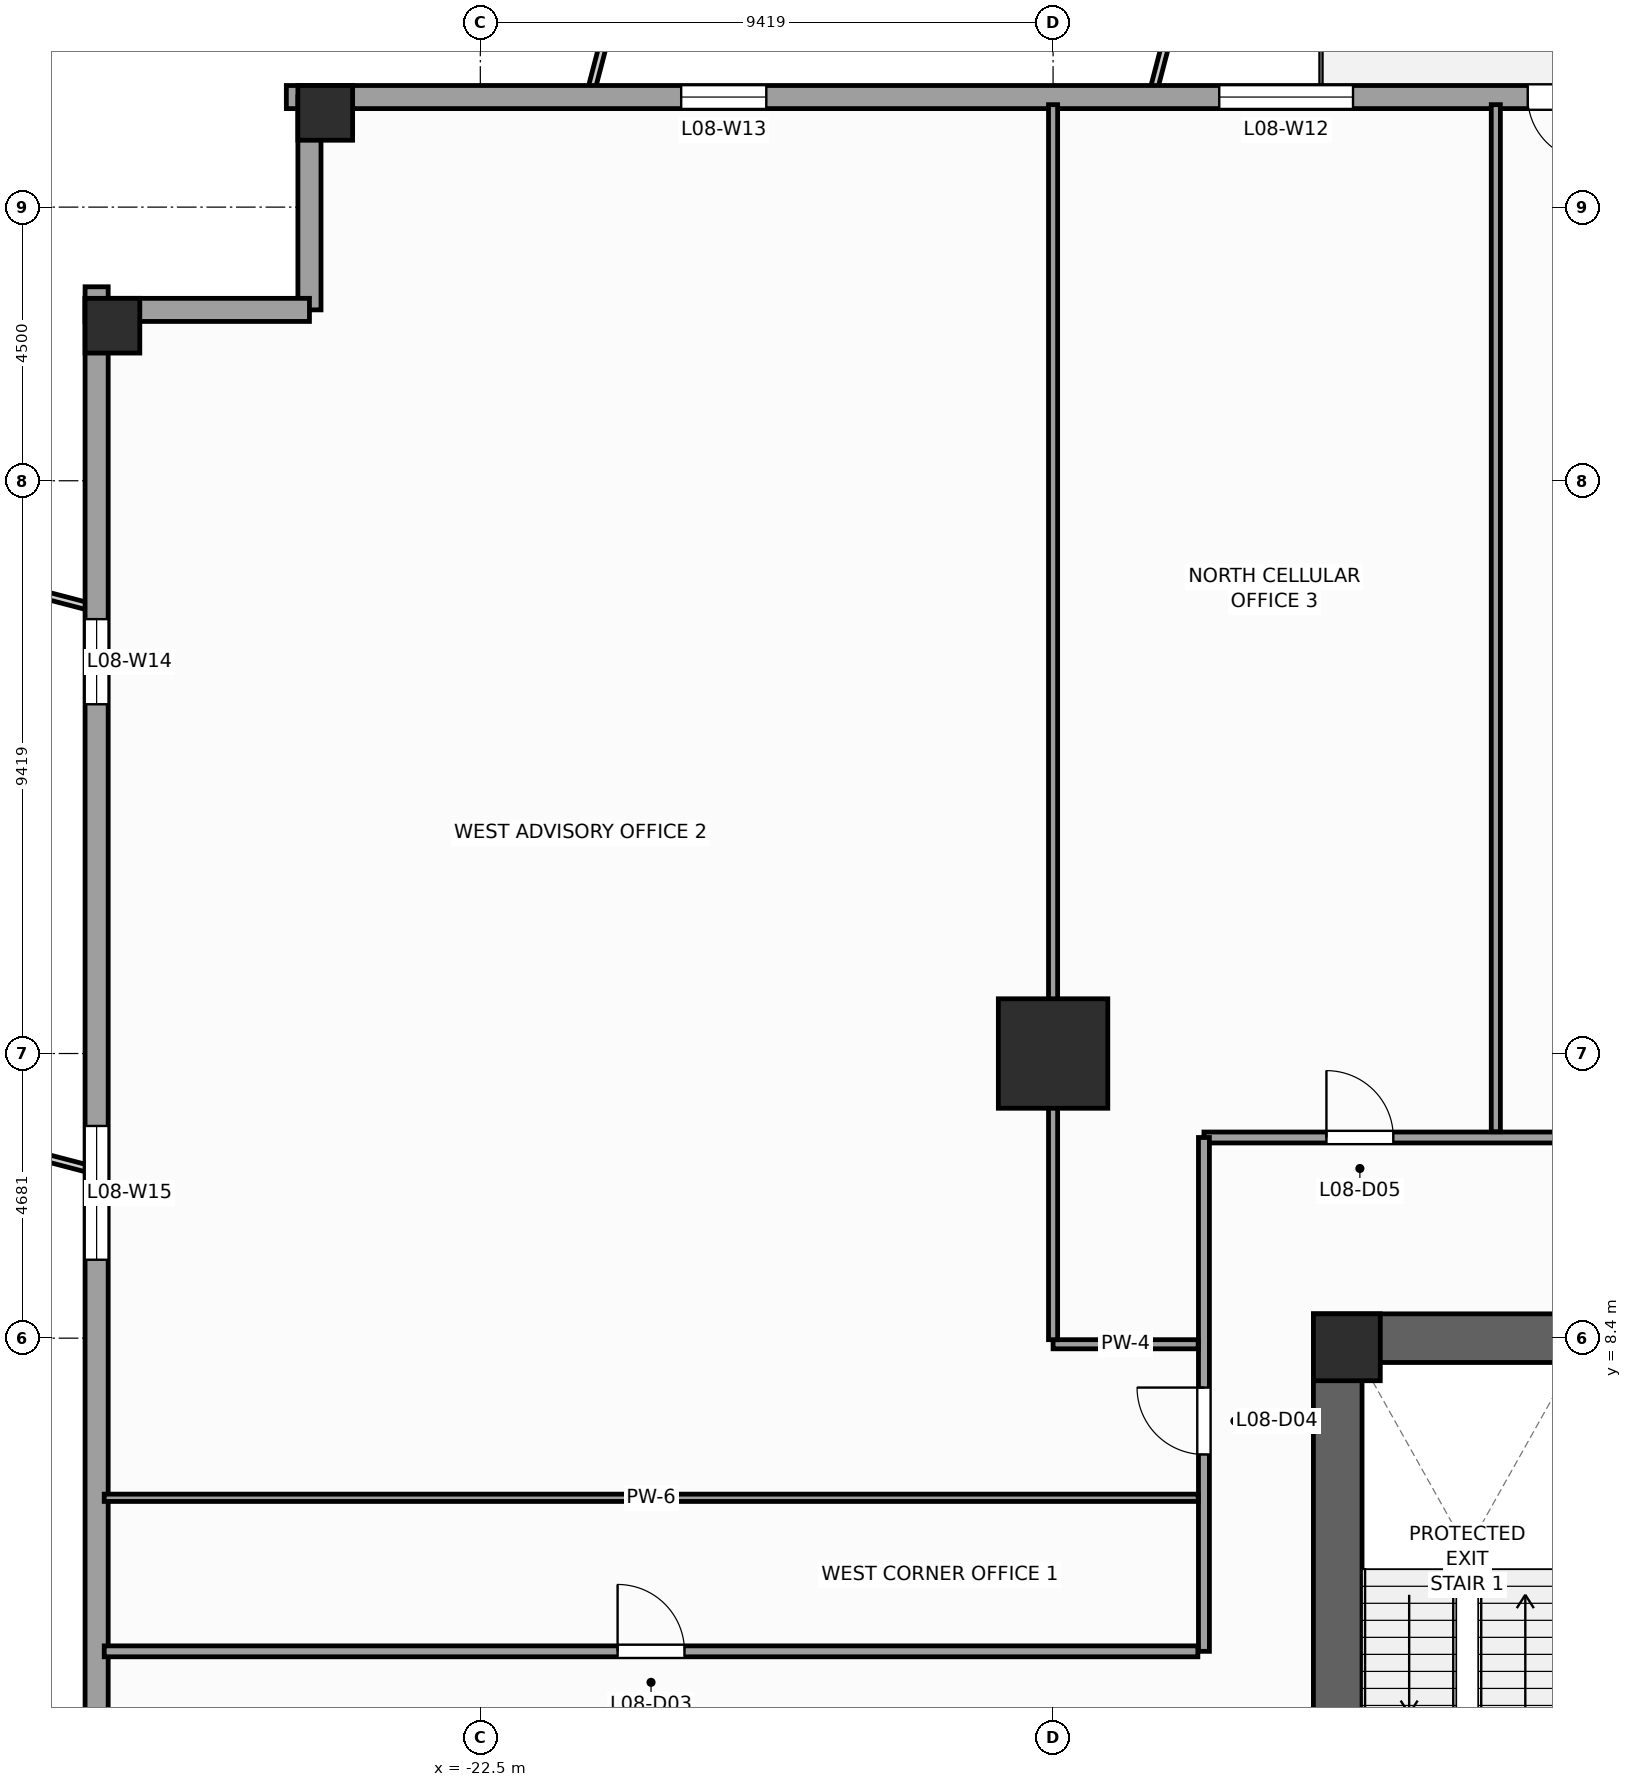
"""IFC4 building model, lengths in metres.
Left out: names, types, materials, properties, quantities, classifications, styles, units other than length and angle.
Written with IfcOpenShell. Run it as: python <this file> out.ifc"""

import sys

from ifc_helpers import new_model, si_unit, direction, frame, frame_2d, origin, origin_2d, place, context, subcontext, project, spatial, rectangle, extrude, source, transform, mapped, element, fill, save


model = new_model("IFC4")
c1 = context("Model", 3, precision=1e-05, world=origin(), true_north=direction((0.0, 1.0)))
c2 = subcontext(c1, "Body", "Model", "MODEL_VIEW")
j1 = project(units=[si_unit("LENGTHUNIT", "METRE"), si_unit("PLANEANGLEUNIT", "RADIAN")], contexts=[c1])
p1 = place(None, origin())
s1 = spatial("IfcSite", under=j1, at=p1, CompositionType="ELEMENT")
p2 = place(p1, origin())
s2 = spatial("IfcBuilding", under=s1, at=p2, CompositionType="ELEMENT")
p3 = place(p2, frame((0.0, 0.0, 38.0)))
s3 = spatial("IfcBuildingStorey", under=s2, at=p3, CompositionType="ELEMENT", Elevation=38.0)
p4 = place(p3, frame((-8.8, 8.4, 0.0), z_axis=(0.0, 0.0, 1.0), x_axis=(1.0, 0.0, 0.0)))
e1 = element("IfcWall", 1, at=p4, inside=s3, PredefinedType="SHEAR", context=c2, shape_type="SweptSolid", body=[
    extrude(rectangle(XDim=17.6, YDim=0.8, at=frame_2d((8.8, 0.0))), origin(), (0.0, 0.0, 1.0), 4.0),
])
p5 = place(p3, frame((-8.4, -8.0, 0.0), z_axis=(0.0, 0.0, 1.0), x_axis=(0.0, 1.0, 0.0)))
e2 = element("IfcWall", 2, at=p5, inside=s3, PredefinedType="SHEAR", context=c2, shape_type="SweptSolid", body=[
    extrude(rectangle(XDim=16.0, YDim=0.8, at=frame_2d((8.0, 0.0))), origin(), (0.0, 0.0, 1.0), 4.0),
])
p6 = place(p5, frame((4.69, 0.0, 0.0)))
e3 = element("IfcOpeningElement", 3, at=p6, cuts=e2, PredefinedType="OPENING", context=c2, shape_type="SweptSolid", body=[
    extrude(rectangle(XDim=1.3, YDim=2.2, at=frame_2d((0.65, 1.1))), frame((0.0, 0.41, 0.0), z_axis=(0.0, -1.0, 0.0), x_axis=(1.0, 0.0, 0.0)), (0.0, 0.0, 1.0), 0.82),
])
m1 = source(origin(), c2, "Body", "SweptSolid", [
    extrude(rectangle(XDim=1.1, YDim=1.1, at=origin_2d()), origin(), (0.0, 0.0, 1.0), 4.0),
])
p7 = place(p3, frame((-8.25, 8.25, 0.0), z_axis=(0.0, 0.0, 1.0), x_axis=(1.0, 0.0, 0.0)))
e4 = element("IfcColumn", 4, at=p7, inside=s3, PredefinedType="PILASTER", context=c2, shape_type="MappedRepresentation", body=[
    mapped(m1, transform((0.0, 0.0, 0.0), scale=1.0)),
])
m2 = source(origin(), c2, "Body", "SweptSolid", [
    extrude(rectangle(XDim=1.8, YDim=1.8, at=origin_2d()), origin(), (0.0, 0.0, 1.0), 4.0),
])
p8 = place(p3, frame((-13.081, 13.081, 0.0), z_axis=(0.0, 0.0, 1.0), x_axis=(1.0, 0.0, 0.0)))
e5 = element("IfcColumn", 5, at=p8, inside=s3, PredefinedType="COLUMN", context=c2, shape_type="MappedRepresentation", body=[
    mapped(m2, transform((0.0, 0.0, 0.0), scale=1.0)),
])
m3 = source(origin(), c2, "Body", "SweptSolid", [
    extrude(rectangle(XDim=0.9, YDim=0.9, at=origin_2d()), origin(), (0.0, 0.0, 1.0), 4.0),
])
for number, where, z_axis, x_axis in (
    (6, (-25.05, 28.55, 0.0), (0.0, 0.0, 1.0), (1.0, 0.0, 0.0)),
    (7, (-28.55, 25.05, 0.0), (0.0, 0.0, 1.0), (1.0, 0.0, 0.0)),
):
    element("IfcColumn", number, at=place(p3, frame(where, z_axis=z_axis, x_axis=x_axis)), inside=s3, PredefinedType="COLUMN", context=c2, shape_type="MappedRepresentation", body=[
        mapped(m3, transform((0.0, 0.0, 0.0), scale=1.0)),
    ])
p9 = place(p3, frame((25.69, 28.81, 0.0), z_axis=(0.0, 0.0, 1.0), x_axis=(-1.0, 0.0, 0.0)))
e8 = element("IfcWall", 8, at=p9, inside=s3, PredefinedType="STANDARD", context=c2, shape_type="SweptSolid", body=[
    extrude(rectangle(XDim=51.38, YDim=0.38, at=frame_2d((25.69, 0.0))), origin(), (0.0, 0.0, 1.0), 3.12),
])
p10 = place(p9, frame((29.915, 0.0, 0.0)))
e9 = element("IfcOpeningElement", 9, at=p10, cuts=e8, PredefinedType="OPENING", context=c2, shape_type="SweptSolid", body=[
    extrude(rectangle(XDim=1.05, YDim=2.25, at=frame_2d((0.525, 1.125))), frame((0.0, 0.2, 0.0), z_axis=(0.0, -1.0, 0.0), x_axis=(1.0, 0.0, 0.0)), (0.0, 0.0, 1.0), 0.4),
])
p11 = place(p9, frame((5.466, 0.0, 0.49)))
e10 = element("IfcOpeningElement", 10, at=p11, cuts=e8, PredefinedType="OPENING", context=c2, shape_type="SweptSolid", body=[
    extrude(rectangle(XDim=1.4, YDim=2.4, at=frame_2d((0.7, 1.2))), frame((0.0, 0.2, 0.0), z_axis=(0.0, -1.0, 0.0), x_axis=(1.0, 0.0, 0.0)), (0.0, 0.0, 1.0), 0.4),
])
p12 = place(p9, frame((13.8, 0.0, 0.49)))
e11 = element("IfcOpeningElement", 11, at=p12, cuts=e8, PredefinedType="OPENING", context=c2, shape_type="SweptSolid", body=[
    extrude(rectangle(XDim=2.2, YDim=2.4, at=frame_2d((1.1, 1.2))), frame((0.0, 0.2, 0.0), z_axis=(0.0, -1.0, 0.0), x_axis=(1.0, 0.0, 0.0)), (0.0, 0.0, 1.0), 0.4),
])
p13 = place(p9, frame((22.062, 0.0, 0.49)))
e12 = element("IfcOpeningElement", 12, at=p13, cuts=e8, PredefinedType="OPENING", context=c2, shape_type="SweptSolid", body=[
    extrude(rectangle(XDim=2.2, YDim=2.4, at=frame_2d((1.1, 1.2))), frame((0.0, 0.2, 0.0), z_axis=(0.0, -1.0, 0.0), x_axis=(1.0, 0.0, 0.0)), (0.0, 0.0, 1.0), 0.4),
])
p14 = place(p9, frame((33.838, 0.0, 0.49)))
e13 = element("IfcOpeningElement", 13, at=p14, cuts=e8, PredefinedType="OPENING", context=c2, shape_type="SweptSolid", body=[
    extrude(rectangle(XDim=2.2, YDim=2.4, at=frame_2d((1.1, 1.2))), frame((0.0, 0.2, 0.0), z_axis=(0.0, -1.0, 0.0), x_axis=(1.0, 0.0, 0.0)), (0.0, 0.0, 1.0), 0.4),
])
p15 = place(p9, frame((43.487, 0.0, 0.49)))
e14 = element("IfcOpeningElement", 14, at=p15, cuts=e8, PredefinedType="OPENING", context=c2, shape_type="SweptSolid", body=[
    extrude(rectangle(XDim=1.4, YDim=2.4, at=frame_2d((0.7, 1.2))), frame((0.0, 0.2, 0.0), z_axis=(0.0, -1.0, 0.0), x_axis=(1.0, 0.0, 0.0)), (0.0, 0.0, 1.0), 0.4),
])
p16 = place(p3, frame((-25.31, 28.81, 0.0), z_axis=(0.0, 0.0, 1.0), x_axis=(0.0, -1.0, 0.0)))
e15 = element("IfcWall", 15, at=p16, inside=s3, PredefinedType="STANDARD", context=c2, shape_type="SweptSolid", body=[
    extrude(rectangle(XDim=3.5, YDim=0.38, at=frame_2d((1.75, 0.0))), origin(), (0.0, 0.0, 1.0), 3.72),
])
p17 = place(p3, frame((-25.31, 25.31, 0.0), z_axis=(0.0, 0.0, 1.0), x_axis=(-1.0, 0.0, 0.0)))
e16 = element("IfcWall", 16, at=p17, inside=s3, PredefinedType="STANDARD", context=c2, shape_type="SweptSolid", body=[
    extrude(rectangle(XDim=3.69, YDim=0.38, at=frame_2d((1.845, 0.0))), origin(), (0.0, 0.0, 1.0), 3.72),
])
p18 = place(p3, frame((-28.81, 25.69, 0.0), z_axis=(0.0, 0.0, 1.0), x_axis=(0.0, -1.0, 0.0)))
e17 = element("IfcWall", 17, at=p18, inside=s3, PredefinedType="STANDARD", context=c2, shape_type="SweptSolid", body=[
    extrude(rectangle(XDim=51.38, YDim=0.38, at=frame_2d((25.69, 0.0))), origin(), (0.0, 0.0, 1.0), 3.12),
])
p19 = place(p18, frame((5.466, 0.0, 0.49)))
e18 = element("IfcOpeningElement", 18, at=p19, cuts=e17, PredefinedType="OPENING", context=c2, shape_type="SweptSolid", body=[
    extrude(rectangle(XDim=1.4, YDim=2.4, at=frame_2d((0.7, 1.2))), frame((0.0, 0.2, 0.0), z_axis=(0.0, -1.0, 0.0), x_axis=(1.0, 0.0, 0.0)), (0.0, 0.0, 1.0), 0.4),
])
p20 = place(p18, frame((13.8, 0.0, 0.49)))
e19 = element("IfcOpeningElement", 19, at=p20, cuts=e17, PredefinedType="OPENING", context=c2, shape_type="SweptSolid", body=[
    extrude(rectangle(XDim=2.2, YDim=2.4, at=frame_2d((1.1, 1.2))), frame((0.0, 0.2, 0.0), z_axis=(0.0, -1.0, 0.0), x_axis=(1.0, 0.0, 0.0)), (0.0, 0.0, 1.0), 0.4),
])
p21 = place(p18, frame((33.838, 0.0, 0.49)))
e20 = element("IfcOpeningElement", 20, at=p21, cuts=e17, PredefinedType="OPENING", context=c2, shape_type="SweptSolid", body=[
    extrude(rectangle(XDim=2.2, YDim=2.4, at=frame_2d((1.1, 1.2))), frame((0.0, 0.2, 0.0), z_axis=(0.0, -1.0, 0.0), x_axis=(1.0, 0.0, 0.0)), (0.0, 0.0, 1.0), 0.4),
])
p22 = place(p18, frame((43.487, 0.0, 0.49)))
e21 = element("IfcOpeningElement", 21, at=p22, cuts=e17, PredefinedType="OPENING", context=c2, shape_type="SweptSolid", body=[
    extrude(rectangle(XDim=1.4, YDim=2.4, at=frame_2d((0.7, 1.2))), frame((0.0, 0.2, 0.0), z_axis=(0.0, -1.0, 0.0), x_axis=(1.0, 0.0, 0.0)), (0.0, 0.0, 1.0), 0.4),
])
p23 = place(p3, frame((-10.6, 11.7, 0.0), z_axis=(0.0, 0.0, 1.0), x_axis=(1.0, 0.0, 0.0)))
e22 = element("IfcWall", 22, at=p23, inside=s3, PredefinedType="PARTITIONING", context=c2, shape_type="SweptSolid", body=[
    extrude(rectangle(XDim=22.3, YDim=0.18, at=frame_2d((11.15, 0.0))), origin(), (0.0, 0.0, 1.0), 3.72),
])
p24 = place(p23, frame((2.014, 0.0, 0.0)))
e23 = element("IfcOpeningElement", 23, at=p24, cuts=e22, PredefinedType="OPENING", context=c2, shape_type="SweptSolid", body=[
    extrude(rectangle(XDim=1.1, YDim=2.2, at=frame_2d((0.55, 1.1))), frame((0.0, 0.1, 0.0), z_axis=(0.0, -1.0, 0.0), x_axis=(1.0, 0.0, 0.0)), (0.0, 0.0, 1.0), 0.2),
])
p25 = place(p23, frame((7.4, 0.0, 0.0)))
e24 = element("IfcOpeningElement", 24, at=p25, cuts=e22, PredefinedType="OPENING", context=c2, shape_type="SweptSolid", body=[
    extrude(rectangle(XDim=1.1, YDim=2.2, at=frame_2d((0.55, 1.1))), frame((0.0, 0.1, 0.0), z_axis=(0.0, -1.0, 0.0), x_axis=(1.0, 0.0, 0.0)), (0.0, 0.0, 1.0), 0.2),
])
p26 = place(p23, frame((13.4, 0.0, 0.0)))
e25 = element("IfcOpeningElement", 25, at=p26, cuts=e22, PredefinedType="OPENING", context=c2, shape_type="SweptSolid", body=[
    extrude(rectangle(XDim=1.1, YDim=2.2, at=frame_2d((0.55, 1.1))), frame((0.0, 0.1, 0.0), z_axis=(0.0, -1.0, 0.0), x_axis=(1.0, 0.0, 0.0)), (0.0, 0.0, 1.0), 0.2),
])
p27 = place(p23, frame((18.835, 0.0, 0.0)))
e26 = element("IfcOpeningElement", 26, at=p27, cuts=e22, PredefinedType="OPENING", context=c2, shape_type="SweptSolid", body=[
    extrude(rectangle(XDim=1.1, YDim=2.2, at=frame_2d((0.55, 1.1))), frame((0.0, 0.1, 0.0), z_axis=(0.0, -1.0, 0.0), x_axis=(1.0, 0.0, 0.0)), (0.0, 0.0, 1.0), 0.2),
])
p28 = place(p3, frame((-10.6, 3.25, 0.0), z_axis=(0.0, 0.0, 1.0), x_axis=(0.0, 1.0, 0.0)))
e27 = element("IfcWall", 27, at=p28, inside=s3, PredefinedType="PARTITIONING", context=c2, shape_type="SweptSolid", body=[
    extrude(rectangle(XDim=8.45, YDim=0.18, at=frame_2d((4.225, 0.0))), origin(), (0.0, 0.0, 1.0), 3.72),
])
p29 = place(p28, frame((3.238, 0.0, 0.0)))
e28 = element("IfcOpeningElement", 28, at=p29, cuts=e27, PredefinedType="OPENING", context=c2, shape_type="SweptSolid", body=[
    extrude(rectangle(XDim=1.1, YDim=2.2, at=frame_2d((0.55, 1.1))), frame((0.0, 0.1, 0.0), z_axis=(0.0, -1.0, 0.0), x_axis=(1.0, 0.0, 0.0)), (0.0, 0.0, 1.0), 0.2),
])
p30 = place(p3, frame((-28.685, 3.25, 0.0), z_axis=(0.0, 0.0, 1.0), x_axis=(1.0, 0.0, 0.0)))
e29 = element("IfcWall", 29, at=p30, inside=s3, PredefinedType="PARTITIONING", context=c2, shape_type="SweptSolid", body=[
    extrude(rectangle(XDim=17.985, YDim=0.18, at=frame_2d((8.993, 0.0))), origin(), (0.0, 0.0, 1.0), 3.72),
])
p31 = place(p30, frame((8.442, 0.0, 0.0)))
e30 = element("IfcOpeningElement", 30, at=p31, cuts=e29, PredefinedType="OPENING", context=c2, shape_type="SweptSolid", body=[
    extrude(rectangle(XDim=1.1, YDim=2.2, at=frame_2d((0.55, 1.1))), frame((0.0, 0.1, 0.0), z_axis=(0.0, -1.0, 0.0), x_axis=(1.0, 0.0, 0.0)), (0.0, 0.0, 1.0), 0.2),
])
p32 = place(p3, frame((-10.695, 8.3, 0.0), z_axis=(0.0, 0.0, 1.0), x_axis=(-1.0, 0.0, 0.0)))
e31 = element("IfcWall", 31, at=p32, inside=s3, PredefinedType="PARTITIONING", context=c2, shape_type="SweptSolid", body=[
    extrude(rectangle(XDim=2.386, YDim=0.15, at=frame_2d((1.193, 0.0))), origin(), (0.0, 0.0, 1.0), 3.72),
])
p33 = place(p3, frame((-13.081, 8.375, 0.0), z_axis=(0.0, 0.0, 1.0), x_axis=(0.0, 1.0, 0.0)))
e32 = element("IfcWall", 32, at=p33, inside=s3, PredefinedType="PARTITIONING", context=c2, shape_type="SweptSolid", body=[
    extrude(rectangle(XDim=20.31, YDim=0.15, at=frame_2d((10.155, 0.0))), origin(), (0.0, 0.0, 1.0), 2.712),
])
p34 = place(p3, frame((-5.8, 11.795, 0.0), z_axis=(0.0, 0.0, 1.0), x_axis=(0.0, 1.0, 0.0)))
e33 = element("IfcWall", 33, at=p34, inside=s3, PredefinedType="PARTITIONING", context=c2, shape_type="SweptSolid", body=[
    extrude(rectangle(XDim=16.89, YDim=0.15, at=frame_2d((8.445, 0.0))), origin(), (0.0, 0.0, 1.0), 3.72),
])
p35 = place(p3, frame((-28.685, 5.775, 0.0), z_axis=(0.0, 0.0, 1.0), x_axis=(1.0, 0.0, 0.0)))
e34 = element("IfcWall", 34, at=p35, inside=s3, PredefinedType="PARTITIONING", context=c2, shape_type="SweptSolid", body=[
    extrude(rectangle(XDim=17.99, YDim=0.12, at=frame_2d((8.995, 0.0))), origin(), (0.0, 0.0, 1.0), 3.72),
])
m4 = source(origin(), c2, "Body", "SweptSolid", [
    extrude(rectangle(XDim=1.05, YDim=2.25, at=frame_2d((0.525, 1.125))), frame((0.0, 0.025, 0.0), z_axis=(0.0, -1.0, 0.0), x_axis=(1.0, 0.0, 0.0)), (0.0, 0.0, 1.0), 0.05),
])
p36 = place(p10, origin())
e35 = element("IfcDoor", 35, at=p36, inside=s3, OperationType="SINGLE_SWING_LEFT", PredefinedType="DOOR", context=c2, shape_type="MappedRepresentation", body=[
    mapped(m4, transform((0.0, 0.0, 0.0), scale=1.0)),
])
fill(e9, e35)
m5 = source(origin(), c2, "Body", "SweptSolid", [
    extrude(rectangle(XDim=2.2, YDim=2.4, at=frame_2d((1.1, 1.2))), frame((0.0, 0.03, 0.0), z_axis=(0.0, -1.0, 0.0), x_axis=(1.0, 0.0, 0.0)), (0.0, 0.0, 1.0), 0.06),
])
p37 = place(p14, origin())
e36 = element("IfcWindow", 36, at=p37, inside=s3, PartitioningType="SINGLE_PANEL", PredefinedType="WINDOW", context=c2, shape_type="MappedRepresentation", body=[
    mapped(m5, transform((0.0, 0.0, 0.0), scale=1.0)),
])
fill(e13, e36)
m6 = source(origin(), c2, "Body", "SweptSolid", [
    extrude(rectangle(XDim=1.4, YDim=2.4, at=frame_2d((0.7, 1.2))), frame((0.0, 0.03, 0.0), z_axis=(0.0, -1.0, 0.0), x_axis=(1.0, 0.0, 0.0)), (0.0, 0.0, 1.0), 0.06),
])
p38 = place(p15, origin())
e37 = element("IfcWindow", 37, at=p38, inside=s3, PartitioningType="SINGLE_PANEL", PredefinedType="WINDOW", context=c2, shape_type="MappedRepresentation", body=[
    mapped(m6, transform((0.0, 0.0, 0.0), scale=1.0)),
])
fill(e14, e37)
p39 = place(p19, origin())
e38 = element("IfcWindow", 38, at=p39, inside=s3, PartitioningType="SINGLE_PANEL", PredefinedType="WINDOW", context=c2, shape_type="MappedRepresentation", body=[
    mapped(m6, transform((0.0, 0.0, 0.0), scale=1.0)),
])
fill(e18, e38)
p40 = place(p20, origin())
e39 = element("IfcWindow", 39, at=p40, inside=s3, PartitioningType="SINGLE_PANEL", PredefinedType="WINDOW", context=c2, shape_type="MappedRepresentation", body=[
    mapped(m5, transform((0.0, 0.0, 0.0), scale=1.0)),
])
fill(e19, e39)
m7 = source(origin(), c2, "Body", "SweptSolid", [
    extrude(rectangle(XDim=1.1, YDim=2.2, at=frame_2d((0.55, 1.1))), frame((0.0, 0.025, 0.0), z_axis=(0.0, -1.0, 0.0), x_axis=(1.0, 0.0, 0.0)), (0.0, 0.0, 1.0), 0.05),
])
p41 = place(p31, origin())
e40 = element("IfcDoor", 40, at=p41, inside=s3, OperationType="SINGLE_SWING_LEFT", PredefinedType="DOOR", context=c2, shape_type="MappedRepresentation", body=[
    mapped(m7, transform((0.0, 0.0, 0.0), scale=1.0)),
])
fill(e30, e40)
p42 = place(p29, origin())
e41 = element("IfcDoor", 41, at=p42, inside=s3, OperationType="SINGLE_SWING_RIGHT", PredefinedType="DOOR", context=c2, shape_type="MappedRepresentation", body=[
    mapped(m7, transform((0.0, 0.0, 0.0), scale=1.0)),
])
fill(e28, e41)
p43 = place(p24, origin())
e42 = element("IfcDoor", 42, at=p43, inside=s3, OperationType="SINGLE_SWING_LEFT", PredefinedType="DOOR", context=c2, shape_type="MappedRepresentation", body=[
    mapped(m7, transform((0.0, 0.0, 0.0), scale=1.0)),
])
fill(e23, e42)
save(model, sys.argv[1])
